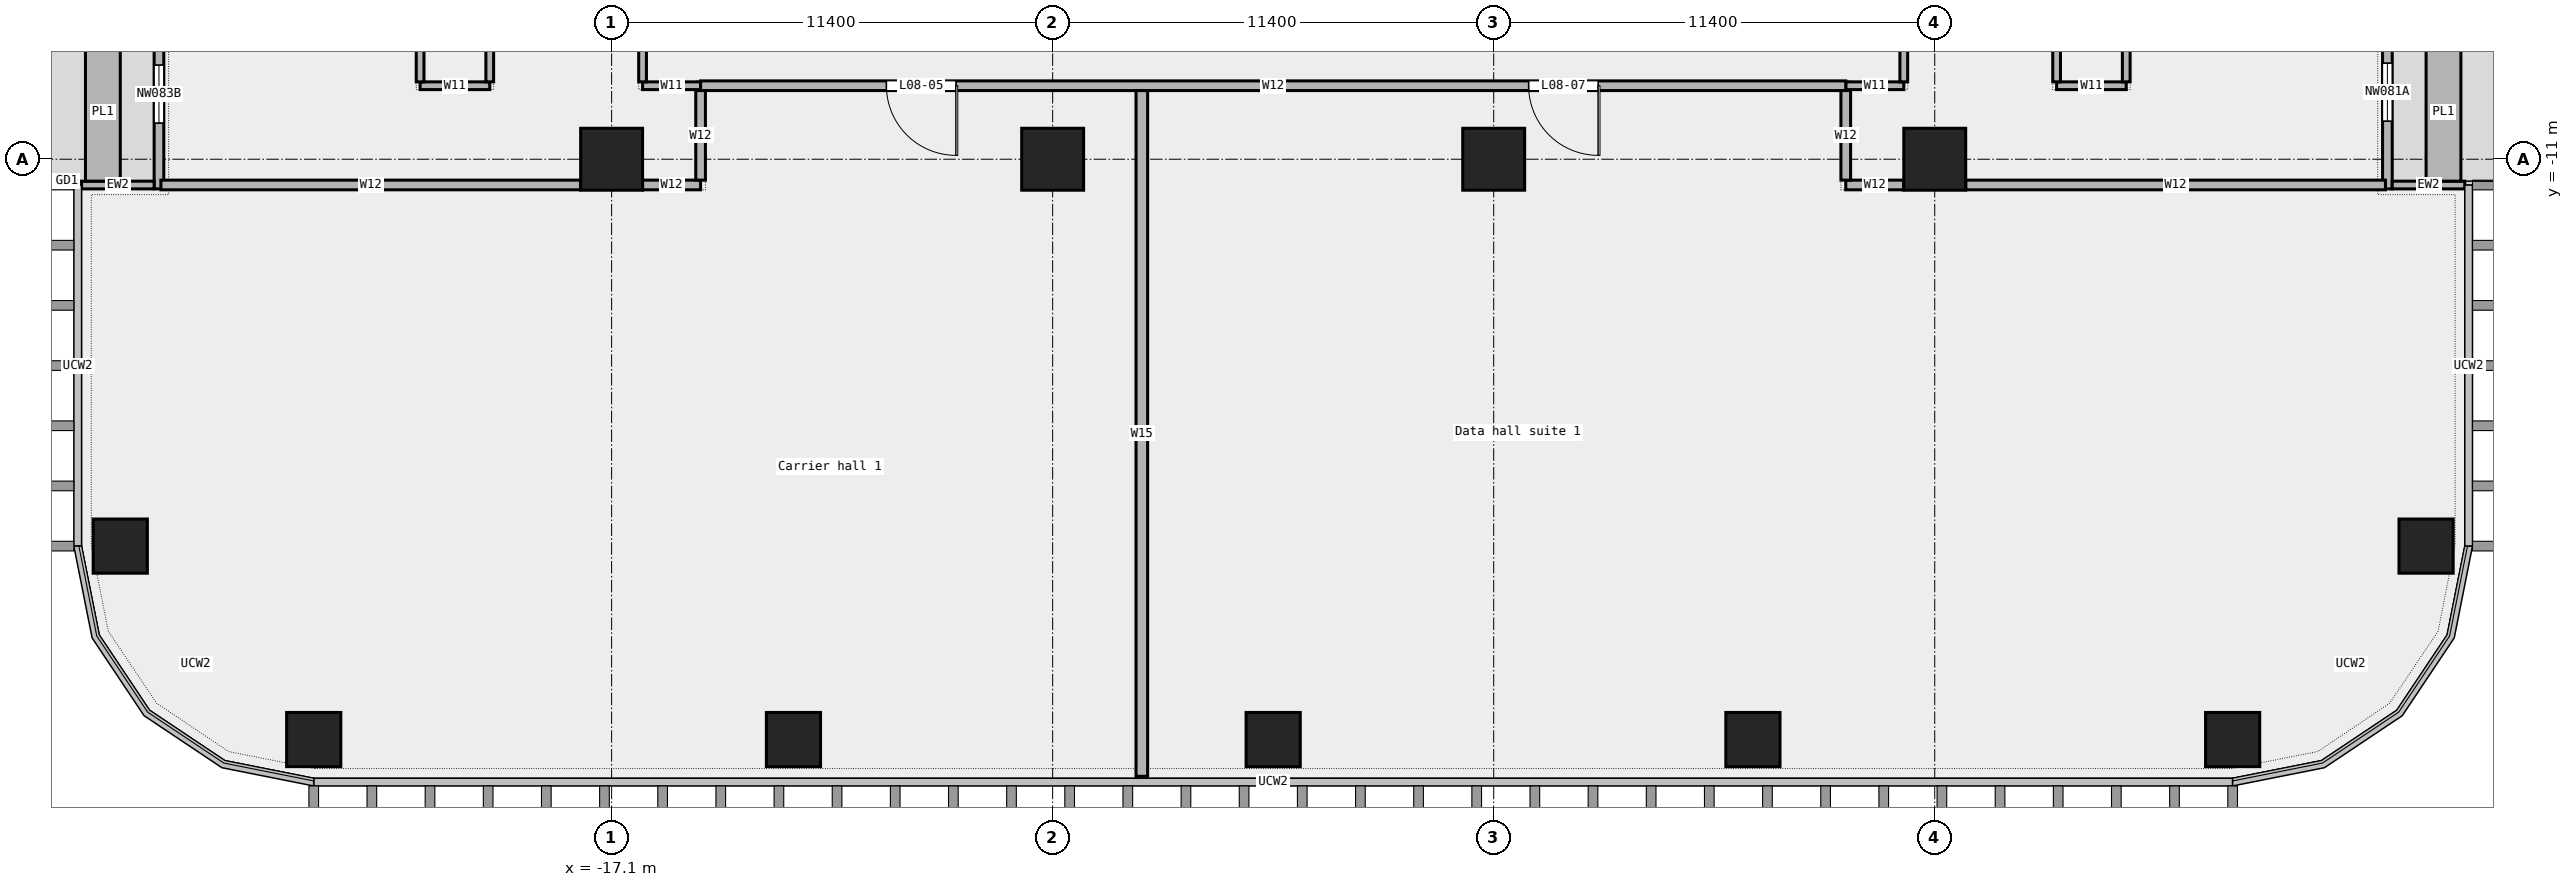
"""IFC4 building model, lengths in metres.
Left out: names, types, materials, properties, quantities, classifications, styles, units other than length and angle.
Written with IfcOpenShell. Run it as: python <this file> out.ifc"""

import sys

from ifc_helpers import new_model, si_unit, direction, frame, frame_2d, origin, origin_2d, place, context, subcontext, project, spatial, rectangle, extrude, element, fill, save


model = new_model("IFC4")
c1 = context("Model", 3, precision=1e-05, world=origin(), true_north=direction((0.0, 1.0)))
c2 = subcontext(c1, "Body", "Model", "MODEL_VIEW")
j1 = project(units=[si_unit("LENGTHUNIT", "METRE"), si_unit("PLANEANGLEUNIT", "RADIAN")], contexts=[c1])
p1 = place(None, origin())
s1 = spatial("IfcSite", under=j1, at=p1, CompositionType="ELEMENT")
p2 = place(p1, origin())
s2 = spatial("IfcBuilding", under=s1, at=p2, CompositionType="ELEMENT")
p3 = place(p2, frame((0.0, 0.0, 45.4)))
s3 = spatial("IfcBuildingStorey", under=s2, at=p3, CompositionType="ELEMENT", Elevation=45.4)
for number, where, z_axis, x_axis in (
    (1, (-24.8, -26.0, 0.0), (0.0, 0.0, 1.0), (1.0, 0.0, 0.0)),
    (2, (-12.4, -26.0, 0.0), (0.0, 0.0, 1.0), (1.0, 0.0, 0.0)),
    (3, (0.0, -26.0, 0.0), (0.0, 0.0, 1.0), (1.0, 0.0, 0.0)),
    (4, (12.4, -26.0, 0.0), (0.0, 0.0, 1.0), (1.0, 0.0, 0.0)),
    (5, (24.8, -26.0, 0.0), (0.0, 0.0, 1.0), (1.0, 0.0, 0.0)),
    (6, (29.8, -21.0, 0.0), (0.0, 0.0, 1.0), (1.0, 0.0, 0.0)),
    (7, (-29.8, -21.0, 0.0), (0.0, 0.0, 1.0), (1.0, 0.0, 0.0)),
):
    element("IfcColumn", number, at=place(p3, frame(where, z_axis=z_axis, x_axis=x_axis)), inside=s3, PredefinedType="COLUMN", context=c2, shape_type="SweptSolid", body=[
        extrude(rectangle(XDim=1.4, YDim=1.4, at=origin_2d()), origin(), (0.0, 0.0, 1.0), 4.35),
    ])
for number, where, z_axis, x_axis in (
    (8, (-17.1, -11.0, 0.0), (0.0, 0.0, 1.0), (1.0, 0.0, 0.0)),
    (9, (-5.7, -11.0, 0.0), (0.0, 0.0, 1.0), (1.0, 0.0, 0.0)),
    (10, (5.7, -11.0, 0.0), (0.0, 0.0, 1.0), (1.0, 0.0, 0.0)),
    (11, (17.1, -11.0, 0.0), (0.0, 0.0, 1.0), (1.0, 0.0, 0.0)),
):
    element("IfcColumn", number, at=place(p3, frame(where, z_axis=z_axis, x_axis=x_axis)), inside=s3, PredefinedType="COLUMN", context=c2, shape_type="SweptSolid", body=[
        extrude(rectangle(XDim=1.6, YDim=1.6, at=origin_2d()), origin(), (0.0, 0.0, 1.0), 4.35),
    ])
p4 = place(p3, frame((28.8, -11.767, 0.0), z_axis=(0.0, 0.0, 1.0), x_axis=(0.0, 1.0, 0.0)))
e12 = element("IfcWall", 12, at=p4, inside=s3, PredefinedType="STANDARD", context=c2, shape_type="SweptSolid", body=[
    extrude(rectangle(XDim=14.2, YDim=0.25, at=frame_2d((7.1, 0.0))), origin(), (0.0, 0.0, 1.0), 4.35),
])
p5 = place(p4, frame((1.75, 0.0, 0.45)))
e13 = element("IfcOpeningElement", 13, at=p5, cuts=e12, PredefinedType="OPENING", context=c2, shape_type="SweptSolid", body=[
    extrude(rectangle(XDim=1.5, YDim=3.0, at=frame_2d((0.75, 1.5))), frame((0.0, 0.137, 0.0), z_axis=(0.0, -1.0, 0.0), x_axis=(1.0, 0.0, 0.0)), (0.0, 0.0, 1.0), 0.274),
])
p6 = place(p4, frame((6.25, 0.0, 0.0)))
e14 = element("IfcOpeningElement", 14, at=p6, cuts=e12, PredefinedType="OPENING", context=c2, shape_type="SweptSolid", body=[
    extrude(rectangle(XDim=1.8, YDim=2.4, at=frame_2d((0.9, 1.2))), frame((0.0, 0.137, 0.0), z_axis=(0.0, -1.0, 0.0), x_axis=(1.0, 0.0, 0.0)), (0.0, 0.0, 1.0), 0.274),
])
p7 = place(p4, frame((11.0, 0.0, 0.45)))
e15 = element("IfcOpeningElement", 15, at=p7, cuts=e12, PredefinedType="OPENING", context=c2, shape_type="SweptSolid", body=[
    extrude(rectangle(XDim=1.5, YDim=3.0, at=frame_2d((0.75, 1.5))), frame((0.0, 0.137, 0.0), z_axis=(0.0, -1.0, 0.0), x_axis=(1.0, 0.0, 0.0)), (0.0, 0.0, 1.0), 0.274),
])
p8 = place(p3, frame((30.8, -11.667, 0.0), z_axis=(0.0, 0.0, 1.0), x_axis=(-1.0, 0.0, 0.0)))
e16 = element("IfcWall", 16, at=p8, inside=s3, PredefinedType="STANDARD", context=c2, shape_type="SweptSolid", body=[
    extrude(rectangle(XDim=1.875, YDim=0.2, at=frame_2d((0.938, 0.0))), origin(), (0.0, 0.0, 1.0), 4.35),
])
p9 = place(p3, frame((30.25, -11.567, 0.0), z_axis=(0.0, 0.0, 1.0), x_axis=(0.0, 1.0, 0.0)))
e17 = element("IfcWall", 17, at=p9, inside=s3, PredefinedType="STANDARD", context=c2, shape_type="SweptSolid", body=[
    extrude(rectangle(XDim=3.6, YDim=0.9, at=frame_2d((1.8, 0.0))), origin(), (0.0, 0.0, 1.0), 0.7),
])
p10 = place(p3, frame((-28.8, 2.433, 0.0), z_axis=(0.0, 0.0, 1.0), x_axis=(0.0, -1.0, 0.0)))
e18 = element("IfcWall", 18, at=p10, inside=s3, PredefinedType="STANDARD", context=c2, shape_type="SweptSolid", body=[
    extrude(rectangle(XDim=14.2, YDim=0.25, at=frame_2d((7.1, 0.0))), origin(), (0.0, 0.0, 1.0), 4.35),
])
p11 = place(p10, frame((1.75, 0.0, 0.45)))
e19 = element("IfcOpeningElement", 19, at=p11, cuts=e18, PredefinedType="OPENING", context=c2, shape_type="SweptSolid", body=[
    extrude(rectangle(XDim=1.5, YDim=3.0, at=frame_2d((0.75, 1.5))), frame((0.0, 0.137, 0.0), z_axis=(0.0, -1.0, 0.0), x_axis=(1.0, 0.0, 0.0)), (0.0, 0.0, 1.0), 0.274),
])
p12 = place(p10, frame((6.25, 0.0, 0.0)))
e20 = element("IfcOpeningElement", 20, at=p12, cuts=e18, PredefinedType="OPENING", context=c2, shape_type="SweptSolid", body=[
    extrude(rectangle(XDim=1.8, YDim=2.4, at=frame_2d((0.9, 1.2))), frame((0.0, 0.137, 0.0), z_axis=(0.0, -1.0, 0.0), x_axis=(1.0, 0.0, 0.0)), (0.0, 0.0, 1.0), 0.274),
])
p13 = place(p10, frame((11.0, 0.0, 0.45)))
e21 = element("IfcOpeningElement", 21, at=p13, cuts=e18, PredefinedType="OPENING", context=c2, shape_type="SweptSolid", body=[
    extrude(rectangle(XDim=1.5, YDim=3.0, at=frame_2d((0.75, 1.5))), frame((0.0, 0.137, 0.0), z_axis=(0.0, -1.0, 0.0), x_axis=(1.0, 0.0, 0.0)), (0.0, 0.0, 1.0), 0.274),
])
p14 = place(p3, frame((-30.8, -11.667, 0.0), z_axis=(0.0, 0.0, 1.0), x_axis=(1.0, 0.0, 0.0)))
e22 = element("IfcWall", 22, at=p14, inside=s3, PredefinedType="STANDARD", context=c2, shape_type="SweptSolid", body=[
    extrude(rectangle(XDim=1.875, YDim=0.2, at=frame_2d((0.938, 0.0))), origin(), (0.0, 0.0, 1.0), 4.35),
])
p15 = place(p3, frame((-30.25, -7.967, 0.0), z_axis=(0.0, 0.0, 1.0), x_axis=(0.0, -1.0, 0.0)))
e23 = element("IfcWall", 23, at=p15, inside=s3, PredefinedType="STANDARD", context=c2, shape_type="SweptSolid", body=[
    extrude(rectangle(XDim=3.6, YDim=0.9, at=frame_2d((1.8, 0.0))), origin(), (0.0, 0.0, 1.0), 0.7),
])
p16 = place(p3, frame((-28.75, -11.665, 0.0), z_axis=(0.0, 0.0, 1.0), x_axis=(1.0, 0.0, 0.0)))
e24 = element("IfcWall", 24, at=p16, inside=s3, PredefinedType="PARTITIONING", context=c2, shape_type="SweptSolid", body=[
    extrude(rectangle(XDim=10.85, YDim=0.25, at=frame_2d((5.425, 0.0))), origin(), (0.0, 0.0, 1.0), 4.35),
])
for number, where, z_axis, x_axis in (
    (25, (-16.3, -11.665, 0.0), (0.0, 0.0, 1.0), (1.0, 0.0, 0.0)),
    (26, (14.8, -11.665, 0.0), (0.0, 0.0, 1.0), (1.0, 0.0, 0.0)),
):
    element("IfcWall", number, at=place(p3, frame(where, z_axis=z_axis, x_axis=x_axis)), inside=s3, PredefinedType="PARTITIONING", context=c2, shape_type="SweptSolid", body=[
        extrude(rectangle(XDim=1.5, YDim=0.25, at=frame_2d((0.75, 0.0))), origin(), (0.0, 0.0, 1.0), 4.35),
    ])
p17 = place(p3, frame((17.9, -11.665, 0.0), z_axis=(0.0, 0.0, 1.0), x_axis=(1.0, 0.0, 0.0)))
e27 = element("IfcWall", 27, at=p17, inside=s3, PredefinedType="PARTITIONING", context=c2, shape_type="SweptSolid", body=[
    extrude(rectangle(XDim=10.85, YDim=0.25, at=frame_2d((5.425, 0.0))), origin(), (0.0, 0.0, 1.0), 4.35),
])
p18 = place(p3, frame((-22.05, -9.1, 0.0), z_axis=(0.0, 0.0, 1.0), x_axis=(1.0, 0.0, 0.0)))
e28 = element("IfcWall", 28, at=p18, inside=s3, PredefinedType="PARTITIONING", context=c2, shape_type="SweptSolid", body=[
    extrude(rectangle(XDim=1.8, YDim=0.2, at=frame_2d((0.9, 0.0))), origin(), (0.0, 0.0, 1.0), 4.35),
])
for number, where, z_axis, x_axis in (
    (29, (-16.3, -9.1, 0.0), (0.0, 0.0, 1.0), (1.0, 0.0, 0.0)),
    (30, (14.8, -9.1, 0.0), (0.0, 0.0, 1.0), (1.0, 0.0, 0.0)),
):
    element("IfcWall", number, at=place(p3, frame(where, z_axis=z_axis, x_axis=x_axis)), inside=s3, PredefinedType="PARTITIONING", context=c2, shape_type="SweptSolid", body=[
        extrude(rectangle(XDim=1.5, YDim=0.2, at=frame_2d((0.75, 0.0))), origin(), (0.0, 0.0, 1.0), 4.35),
    ])
p19 = place(p3, frame((20.25, -9.1, 0.0), z_axis=(0.0, 0.0, 1.0), x_axis=(1.0, 0.0, 0.0)))
e31 = element("IfcWall", 31, at=p19, inside=s3, PredefinedType="PARTITIONING", context=c2, shape_type="SweptSolid", body=[
    extrude(rectangle(XDim=1.8, YDim=0.2, at=frame_2d((0.9, 0.0))), origin(), (0.0, 0.0, 1.0), 4.35),
])
p20 = place(p3, frame((-14.8, -9.1, 0.0), z_axis=(0.0, 0.0, 1.0), x_axis=(1.0, 0.0, 0.0)))
e32 = element("IfcWall", 32, at=p20, inside=s3, PredefinedType="PARTITIONING", context=c2, shape_type="SweptSolid", body=[
    extrude(rectangle(XDim=29.6, YDim=0.25, at=frame_2d((14.8, 0.0))), origin(), (0.0, 0.0, 1.0), 4.35),
])
p21 = place(p20, frame((4.802, 0.0, 0.0)))
e33 = element("IfcOpeningElement", 33, at=p21, cuts=e32, PredefinedType="OPENING", context=c2, shape_type="SweptSolid", body=[
    extrude(rectangle(XDim=1.8, YDim=2.1, at=frame_2d((0.9, 1.05))), frame((0.0, 0.137, 0.0), z_axis=(0.0, -1.0, 0.0), x_axis=(1.0, 0.0, 0.0)), (0.0, 0.0, 1.0), 0.274),
])
p22 = place(p20, frame((21.403, 0.0, 0.0)))
e34 = element("IfcOpeningElement", 34, at=p22, cuts=e32, PredefinedType="OPENING", context=c2, shape_type="SweptSolid", body=[
    extrude(rectangle(XDim=1.8, YDim=2.1, at=frame_2d((0.9, 1.05))), frame((0.0, 0.137, 0.0), z_axis=(0.0, -1.0, 0.0), x_axis=(1.0, 0.0, 0.0)), (0.0, 0.0, 1.0), 0.274),
])
p23 = place(p3, frame((-22.05, -9.0, 0.0), z_axis=(0.0, 0.0, 1.0), x_axis=(0.0, 1.0, 0.0)))
e35 = element("IfcWall", 35, at=p23, inside=s3, PredefinedType="PARTITIONING", context=c2, shape_type="SweptSolid", body=[
    extrude(rectangle(XDim=24.3, YDim=0.2, at=frame_2d((12.15, 0.0))), origin(), (0.0, 0.0, 1.0), 4.35),
])
p24 = place(p23, frame((17.067, 0.0, 0.0)))
e36 = element("IfcOpeningElement", 36, at=p24, cuts=e35, PredefinedType="OPENING", context=c2, shape_type="SweptSolid", body=[
    extrude(rectangle(XDim=1.5, YDim=2.1, at=frame_2d((0.75, 1.05))), frame((0.0, 0.112, 0.0), z_axis=(0.0, -1.0, 0.0), x_axis=(1.0, 0.0, 0.0)), (0.0, 0.0, 1.0), 0.224),
])
p25 = place(p23, frame((4.768, 0.0, 0.0)))
e37 = element("IfcOpeningElement", 37, at=p25, cuts=e35, PredefinedType="OPENING", context=c2, shape_type="SweptSolid", body=[
    extrude(rectangle(XDim=1.8, YDim=2.1, at=frame_2d((0.9, 1.05))), frame((0.0, 0.112, 0.0), z_axis=(0.0, -1.0, 0.0), x_axis=(1.0, 0.0, 0.0)), (0.0, 0.0, 1.0), 0.224),
])
p26 = place(p3, frame((-20.25, -9.0, 0.0), z_axis=(0.0, 0.0, 1.0), x_axis=(0.0, 1.0, 0.0)))
e38 = element("IfcWall", 38, at=p26, inside=s3, PredefinedType="PARTITIONING", context=c2, shape_type="SweptSolid", body=[
    extrude(rectangle(XDim=11.15, YDim=0.2, at=frame_2d((5.575, 0.0))), origin(), (0.0, 0.0, 1.0), 4.35),
])
p27 = place(p3, frame((-16.3, -9.0, 0.0), z_axis=(0.0, 0.0, 1.0), x_axis=(0.0, 1.0, 0.0)))
e39 = element("IfcWall", 39, at=p27, inside=s3, PredefinedType="PARTITIONING", context=c2, shape_type="SweptSolid", body=[
    extrude(rectangle(XDim=8.2, YDim=0.2, at=frame_2d((4.1, 0.0))), origin(), (0.0, 0.0, 1.0), 4.35),
])
p28 = place(p3, frame((-14.8, -11.54, 0.0), z_axis=(0.0, 0.0, 1.0), x_axis=(0.0, 1.0, 0.0)))
e40 = element("IfcWall", 40, at=p28, inside=s3, PredefinedType="PARTITIONING", context=c2, shape_type="SweptSolid", body=[
    extrude(rectangle(XDim=2.315, YDim=0.25, at=frame_2d((1.157, 0.0))), origin(), (0.0, 0.0, 1.0), 4.35),
])
p29 = place(p3, frame((-3.395, -26.95, 0.0), z_axis=(0.0, 0.0, 1.0), x_axis=(0.0, 1.0, 0.0)))
e41 = element("IfcWall", 41, at=p29, inside=s3, PredefinedType="PARTITIONING", context=c2, shape_type="SweptSolid", body=[
    extrude(rectangle(XDim=17.725, YDim=0.3, at=frame_2d((8.862, 0.0))), origin(), (0.0, 0.0, 1.0), 4.35),
])
p30 = place(p3, frame((14.8, -11.54, 0.0), z_axis=(0.0, 0.0, 1.0), x_axis=(0.0, 1.0, 0.0)))
e42 = element("IfcWall", 42, at=p30, inside=s3, PredefinedType="PARTITIONING", context=c2, shape_type="SweptSolid", body=[
    extrude(rectangle(XDim=2.315, YDim=0.25, at=frame_2d((1.157, 0.0))), origin(), (0.0, 0.0, 1.0), 4.35),
])
p31 = place(p3, frame((16.3, -9.0, 0.0), z_axis=(0.0, 0.0, 1.0), x_axis=(0.0, 1.0, 0.0)))
e43 = element("IfcWall", 43, at=p31, inside=s3, PredefinedType="PARTITIONING", context=c2, shape_type="SweptSolid", body=[
    extrude(rectangle(XDim=8.2, YDim=0.2, at=frame_2d((4.1, 0.0))), origin(), (0.0, 0.0, 1.0), 4.35),
])
p32 = place(p3, frame((20.25, -9.0, 0.0), z_axis=(0.0, 0.0, 1.0), x_axis=(0.0, 1.0, 0.0)))
e44 = element("IfcWall", 44, at=p32, inside=s3, PredefinedType="PARTITIONING", context=c2, shape_type="SweptSolid", body=[
    extrude(rectangle(XDim=11.15, YDim=0.2, at=frame_2d((5.575, 0.0))), origin(), (0.0, 0.0, 1.0), 4.35),
])
p33 = place(p3, frame((22.05, -9.0, 0.0), z_axis=(0.0, 0.0, 1.0), x_axis=(0.0, 1.0, 0.0)))
e45 = element("IfcWall", 45, at=p33, inside=s3, PredefinedType="PARTITIONING", context=c2, shape_type="SweptSolid", body=[
    extrude(rectangle(XDim=11.21, YDim=0.2, at=frame_2d((5.605, 0.0))), origin(), (0.0, 0.0, 1.0), 4.35),
])
p34 = place(p33, frame((4.705, 0.0, 0.0)))
e46 = element("IfcOpeningElement", 46, at=p34, cuts=e45, PredefinedType="OPENING", context=c2, shape_type="SweptSolid", body=[
    extrude(rectangle(XDim=1.8, YDim=2.1, at=frame_2d((0.9, 1.05))), frame((0.0, 0.112, 0.0), z_axis=(0.0, -1.0, 0.0), x_axis=(1.0, 0.0, 0.0)), (0.0, 0.0, 1.0), 0.224),
])
p35 = place(p5, origin())
e47 = element("IfcWindow", 47, at=p35, inside=s3, PartitioningType="SINGLE_PANEL", PredefinedType="WINDOW", context=c2, shape_type="SweptSolid", body=[
    extrude(rectangle(XDim=1.5, YDim=3.0, at=frame_2d((0.75, 1.5))), frame((0.0, 0.03, 0.0), z_axis=(0.0, -1.0, 0.0), x_axis=(1.0, 0.0, 0.0)), (0.0, 0.0, 1.0), 0.06),
])
fill(e13, e47)
p36 = place(p13, origin())
e48 = element("IfcWindow", 48, at=p36, inside=s3, PartitioningType="SINGLE_PANEL", PredefinedType="WINDOW", context=c2, shape_type="SweptSolid", body=[
    extrude(rectangle(XDim=1.5, YDim=3.0, at=frame_2d((0.75, 1.5))), frame((0.0, 0.03, 0.0), z_axis=(0.0, -1.0, 0.0), x_axis=(1.0, 0.0, 0.0)), (0.0, 0.0, 1.0), 0.06),
])
fill(e21, e48)
p37 = place(p21, origin())
e49 = element("IfcDoor", 49, at=p37, inside=s3, OperationType="DOUBLE_DOOR_SINGLE_SWING", PredefinedType="DOOR", context=c2, shape_type="SweptSolid", body=[
    extrude(rectangle(XDim=1.8, YDim=2.1, at=frame_2d((0.9, 1.05))), frame((0.0, 0.025, 0.0), z_axis=(0.0, -1.0, 0.0), x_axis=(1.0, 0.0, 0.0)), (0.0, 0.0, 1.0), 0.05),
])
fill(e33, e49)
p38 = place(p22, origin())
e50 = element("IfcDoor", 50, at=p38, inside=s3, OperationType="DOUBLE_DOOR_SINGLE_SWING", PredefinedType="DOOR", context=c2, shape_type="SweptSolid", body=[
    extrude(rectangle(XDim=1.8, YDim=2.1, at=frame_2d((0.9, 1.05))), frame((0.0, 0.025, 0.0), z_axis=(0.0, -1.0, 0.0), x_axis=(1.0, 0.0, 0.0)), (0.0, 0.0, 1.0), 0.05),
])
fill(e34, e50)
save(model, sys.argv[1])
